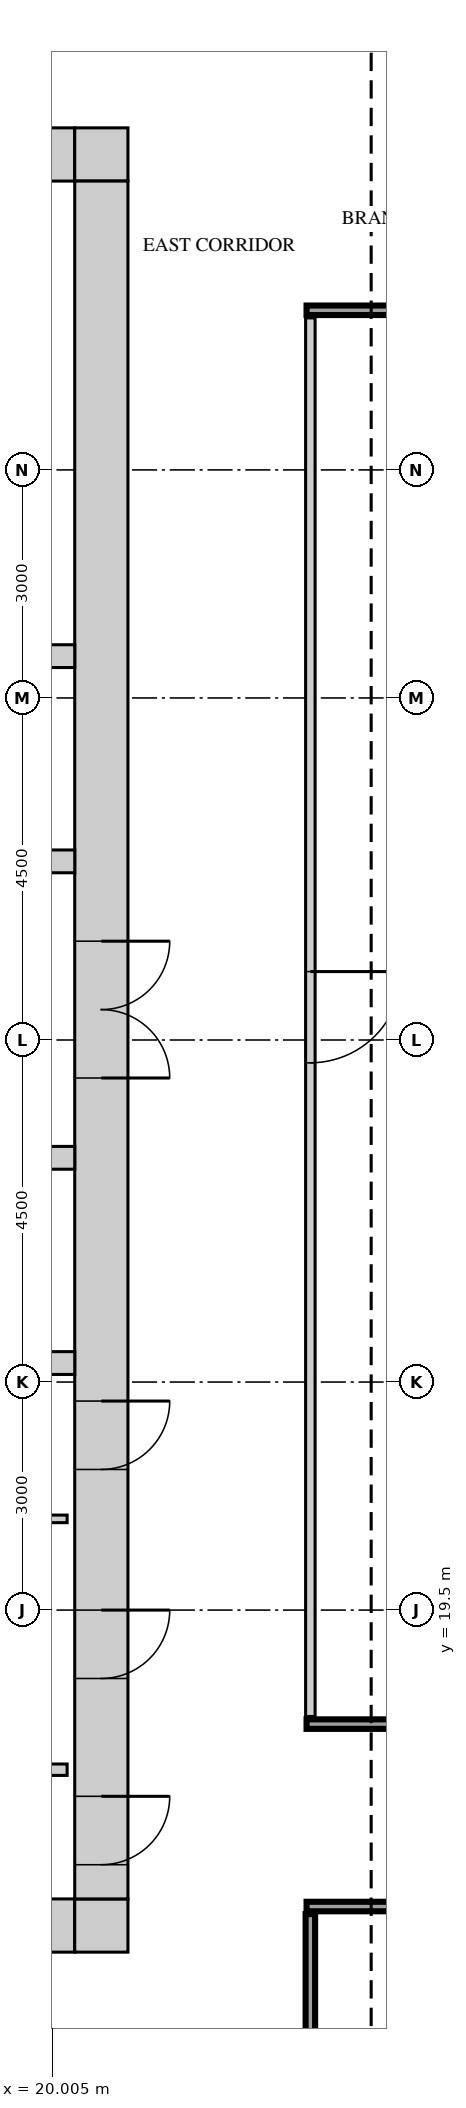
"""IFC4 building model, lengths in metres.
Left out: names, types, materials, properties, quantities, classifications, styles, units other than length and angle.
Written with IfcOpenShell. Run it as: python <this file> out.ifc"""

import sys

from ifc_helpers import new_model, si_unit, direction, frame, frame_2d, origin, place, context, subcontext, project, spatial, rectangle, extrude, source, transform, mapped, element, fill, save


model = new_model("IFC4")
c1 = context("Model", 3, precision=1e-05, world=origin(), true_north=direction((0.0, 1.0)))
c2 = subcontext(c1, "Body", "Model", "MODEL_VIEW")
j1 = project(units=[si_unit("LENGTHUNIT", "METRE"), si_unit("PLANEANGLEUNIT", "RADIAN")], contexts=[c1])
p1 = place(None, origin())
s1 = spatial("IfcSite", under=j1, at=p1, CompositionType="ELEMENT")
p2 = place(p1, origin())
s2 = spatial("IfcBuilding", under=s1, at=p2, CompositionType="ELEMENT")
p3 = place(p2, frame((0.0, 0.0, 222.2)))
s3 = spatial("IfcBuildingStorey", under=s2, at=p3, CompositionType="ELEMENT", Elevation=222.2)
m1 = source(origin(), c2, "Body", "SweptSolid", [
    extrude(rectangle(XDim=13.6, YDim=0.7, at=frame_2d((6.8, 0.0))), origin(), (0.0, 0.0, 1.0), 3.75),
])
p4 = place(p3, frame((6.7, 38.65, 0.0), z_axis=(0.0, 0.0, 1.0), x_axis=(1.0, 0.0, 0.0)))
e1 = element("IfcWall", 1, at=p4, inside=s3, PredefinedType="SHEAR", context=c2, shape_type="MappedRepresentation", body=[
    mapped(m1, transform((0.0, 0.0, 0.0))),
])
m2 = source(origin(), c2, "Body", "SweptSolid", [
    extrude(rectangle(XDim=0.9, YDim=2.1, at=frame_2d((0.45, 1.05))), frame((0.0, 0.36, 0.0), z_axis=(0.0, -1.0, 0.0), x_axis=(1.0, 0.0, 0.0)), (0.0, 0.0, 1.0), 0.72),
])
p5 = place(p4, frame((3.0, 0.0, 0.0)))
e2 = element("IfcOpeningElement", 2, at=p5, cuts=e1, PredefinedType="OPENING", context=c2, shape_type="MappedRepresentation", body=[
    mapped(m2, transform((0.0, 0.0, 0.0))),
])
p6 = place(p4, frame((9.7, 0.0, 0.0)))
e3 = element("IfcOpeningElement", 3, at=p6, cuts=e1, PredefinedType="OPENING", context=c2, shape_type="MappedRepresentation", body=[
    mapped(m2, transform((0.0, 0.0, 0.0))),
])
m3 = source(origin(), c2, "Body", "SweptSolid", [
    extrude(rectangle(XDim=0.7, YDim=0.7, at=frame_2d((0.35, 0.0))), origin(), (0.0, 0.0, 1.0), 3.75),
])
p7 = place(p3, frame((20.3, 38.65, 0.0), z_axis=(0.0, 0.0, 1.0), x_axis=(1.0, 0.0, 0.0)))
e4 = element("IfcWall", 4, at=p7, inside=s3, PredefinedType="SHEAR", context=c2, shape_type="MappedRepresentation", body=[
    mapped(m3, transform((0.0, 0.0, 0.0))),
])
p8 = place(p3, frame((6.7, 15.35, 0.0), z_axis=(0.0, 0.0, 1.0), x_axis=(1.0, 0.0, 0.0)))
e5 = element("IfcWall", 5, at=p8, inside=s3, PredefinedType="SHEAR", context=c2, shape_type="MappedRepresentation", body=[
    mapped(m1, transform((0.0, 0.0, 0.0))),
])
m4 = source(origin(), c2, "Body", "SweptSolid", [
    extrude(rectangle(XDim=1.2, YDim=2.1, at=frame_2d((0.6, 1.05))), frame((0.0, 0.36, 0.0), z_axis=(0.0, -1.0, 0.0), x_axis=(1.0, 0.0, 0.0)), (0.0, 0.0, 1.0), 0.72),
])
p9 = place(p8, frame((5.5, 0.0, 0.0)))
e6 = element("IfcOpeningElement", 6, at=p9, cuts=e5, PredefinedType="OPENING", context=c2, shape_type="MappedRepresentation", body=[
    mapped(m4, transform((0.0, 0.0, 0.0))),
])
p10 = place(p8, frame((2.15, 0.0, 0.0)))
e7 = element("IfcOpeningElement", 7, at=p10, cuts=e5, PredefinedType="OPENING", context=c2, shape_type="MappedRepresentation", body=[
    mapped(m4, transform((0.0, 0.0, 0.0))),
])
m5 = source(origin(), c2, "Body", "SweptSolid", [
    extrude(rectangle(XDim=1.0, YDim=2.1, at=frame_2d((0.5, 1.05))), frame((0.0, 0.36, 0.0), z_axis=(0.0, -1.0, 0.0), x_axis=(1.0, 0.0, 0.0)), (0.0, 0.0, 1.0), 0.72),
])
p11 = place(p8, frame((8.0, 0.0, 0.0)))
e8 = element("IfcOpeningElement", 8, at=p11, cuts=e5, PredefinedType="OPENING", context=c2, shape_type="MappedRepresentation", body=[
    mapped(m5, transform((0.0, 0.0, 0.0))),
])
p12 = place(p3, frame((20.3, 15.35, 0.0), z_axis=(0.0, 0.0, 1.0), x_axis=(1.0, 0.0, 0.0)))
e9 = element("IfcWall", 9, at=p12, inside=s3, PredefinedType="SHEAR", context=c2, shape_type="MappedRepresentation", body=[
    mapped(m3, transform((0.0, 0.0, 0.0))),
])
m6 = source(origin(), c2, "Body", "SweptSolid", [
    extrude(rectangle(XDim=22.6, YDim=0.7, at=frame_2d((11.3, 0.0))), origin(), (0.0, 0.0, 1.0), 3.75),
])
p13 = place(p3, frame((20.65, 15.7, 0.0), z_axis=(0.0, 0.0, 1.0), x_axis=(0.0, 1.0, 0.0)))
e10 = element("IfcWall", 10, at=p13, inside=s3, PredefinedType="SHEAR", context=c2, shape_type="MappedRepresentation", body=[
    mapped(m6, transform((0.0, 0.0, 0.0))),
])
m7 = source(origin(), c2, "Body", "SweptSolid", [
    extrude(rectangle(XDim=1.8, YDim=2.1, at=frame_2d((0.9, 1.05))), frame((0.0, 0.36, 0.0), z_axis=(0.0, -1.0, 0.0), x_axis=(1.0, 0.0, 0.0)), (0.0, 0.0, 1.0), 0.72),
])
p14 = place(p13, frame((10.8, 0.0, 0.0)))
e11 = element("IfcOpeningElement", 11, at=p14, cuts=e10, PredefinedType="OPENING", context=c2, shape_type="MappedRepresentation", body=[
    mapped(m7, transform((0.0, 0.0, 0.0))),
])
p15 = place(p13, frame((0.45, 0.0, 0.0)))
e12 = element("IfcOpeningElement", 12, at=p15, cuts=e10, PredefinedType="OPENING", context=c2, shape_type="MappedRepresentation", body=[
    mapped(m2, transform((0.0, 0.0, 0.0))),
])
p16 = place(p13, frame((2.9, 0.0, 0.0)))
e13 = element("IfcOpeningElement", 13, at=p16, cuts=e10, PredefinedType="OPENING", context=c2, shape_type="MappedRepresentation", body=[
    mapped(m2, transform((0.0, 0.0, 0.0))),
])
p17 = place(p13, frame((5.65, 0.0, 0.0)))
e14 = element("IfcOpeningElement", 14, at=p17, cuts=e10, PredefinedType="OPENING", context=c2, shape_type="MappedRepresentation", body=[
    mapped(m2, transform((0.0, 0.0, 0.0))),
])
m8 = source(origin(), c2, "Body", "SweptSolid", [
    extrude(rectangle(XDim=13.6, YDim=0.3, at=frame_2d((6.8, 0.0))), origin(), (0.0, 0.0, 1.0), 3.75),
])
for number, where, z_axis, x_axis in (
    (15, (6.7, 22.75, 0.0), (0.0, 0.0, 1.0), (1.0, 0.0, 0.0)),
    (16, (6.7, 32.05, 0.0), (0.0, 0.0, 1.0), (1.0, 0.0, 0.0)),
):
    element("IfcWall", number, at=place(p3, frame(where, z_axis=z_axis, x_axis=x_axis)), inside=s3, PredefinedType="STANDARD", context=c2, shape_type="MappedRepresentation", body=[
        mapped(m8, transform((0.0, 0.0, 0.0))),
    ])
p18 = place(p3, frame((6.7, 29.35, 0.0), z_axis=(0.0, 0.0, 1.0), x_axis=(1.0, 0.0, 0.0)))
e17 = element("IfcWall", 17, at=p18, inside=s3, PredefinedType="STANDARD", context=c2, shape_type="MappedRepresentation", body=[
    mapped(m8, transform((0.0, 0.0, 0.0))),
])
m9 = source(origin(), c2, "Body", "SweptSolid", [
    extrude(rectangle(XDim=1.2, YDim=2.1, at=frame_2d((0.6, 1.05))), frame((0.0, 0.16, 0.0), z_axis=(0.0, -1.0, 0.0), x_axis=(1.0, 0.0, 0.0)), (0.0, 0.0, 1.0), 0.32),
])
p19 = place(p18, frame((1.05, 0.0, 0.0)))
e18 = element("IfcOpeningElement", 18, at=p19, cuts=e17, PredefinedType="OPENING", context=c2, shape_type="MappedRepresentation", body=[
    mapped(m9, transform((0.0, 0.0, 0.0))),
])
p20 = place(p18, frame((3.6, 0.0, 0.0)))
e19 = element("IfcOpeningElement", 19, at=p20, cuts=e17, PredefinedType="OPENING", context=c2, shape_type="MappedRepresentation", body=[
    mapped(m9, transform((0.0, 0.0, 0.0))),
])
p21 = place(p18, frame((6.15, 0.0, 0.0)))
e20 = element("IfcOpeningElement", 20, at=p21, cuts=e17, PredefinedType="OPENING", context=c2, shape_type="MappedRepresentation", body=[
    mapped(m9, transform((0.0, 0.0, 0.0))),
])
p22 = place(p18, frame((8.7, 0.0, 0.0)))
e21 = element("IfcOpeningElement", 21, at=p22, cuts=e17, PredefinedType="OPENING", context=c2, shape_type="MappedRepresentation", body=[
    mapped(m9, transform((0.0, 0.0, 0.0))),
])
p23 = place(p18, frame((11.25, 0.0, 0.0)))
e22 = element("IfcOpeningElement", 22, at=p23, cuts=e17, PredefinedType="OPENING", context=c2, shape_type="MappedRepresentation", body=[
    mapped(m9, transform((0.0, 0.0, 0.0))),
])
p24 = place(p3, frame((6.7, 25.45, 0.0), z_axis=(0.0, 0.0, 1.0), x_axis=(1.0, 0.0, 0.0)))
e23 = element("IfcWall", 23, at=p24, inside=s3, PredefinedType="STANDARD", context=c2, shape_type="MappedRepresentation", body=[
    mapped(m8, transform((0.0, 0.0, 0.0))),
])
p25 = place(p24, frame((1.05, 0.0, 0.0)))
e24 = element("IfcOpeningElement", 24, at=p25, cuts=e23, PredefinedType="OPENING", context=c2, shape_type="MappedRepresentation", body=[
    mapped(m9, transform((0.0, 0.0, 0.0))),
])
p26 = place(p24, frame((3.6, 0.0, 0.0)))
e25 = element("IfcOpeningElement", 25, at=p26, cuts=e23, PredefinedType="OPENING", context=c2, shape_type="MappedRepresentation", body=[
    mapped(m9, transform((0.0, 0.0, 0.0))),
])
p27 = place(p24, frame((6.15, 0.0, 0.0)))
e26 = element("IfcOpeningElement", 26, at=p27, cuts=e23, PredefinedType="OPENING", context=c2, shape_type="MappedRepresentation", body=[
    mapped(m9, transform((0.0, 0.0, 0.0))),
])
p28 = place(p24, frame((8.7, 0.0, 0.0)))
e27 = element("IfcOpeningElement", 27, at=p28, cuts=e23, PredefinedType="OPENING", context=c2, shape_type="MappedRepresentation", body=[
    mapped(m9, transform((0.0, 0.0, 0.0))),
])
p29 = place(p24, frame((11.25, 0.0, 0.0)))
e28 = element("IfcOpeningElement", 28, at=p29, cuts=e23, PredefinedType="OPENING", context=c2, shape_type="MappedRepresentation", body=[
    mapped(m9, transform((0.0, 0.0, 0.0))),
])
m10 = source(origin(), c2, "Body", "SweptSolid", [
    extrude(rectangle(XDim=10.85, YDim=0.125, at=frame_2d((5.425, 0.0))), origin(), (0.0, 0.0, 1.0), 3.8),
])
p30 = place(p3, frame((23.4, 4.65, 0.0), z_axis=(0.0, 0.0, 1.0), x_axis=(0.0, 1.0, 0.0)))
e29 = element("IfcWall", 29, at=p30, inside=s3, PredefinedType="PARTITIONING", context=c2, shape_type="MappedRepresentation", body=[
    mapped(m10, transform((0.0, 0.0, 0.0))),
])
m11 = source(origin(), c2, "Body", "SweptSolid", [
    extrude(rectangle(XDim=0.9, YDim=2.1, at=frame_2d((0.45, 1.05))), frame((0.0, 0.073, 0.0), z_axis=(0.0, -1.0, 0.0), x_axis=(1.0, 0.0, 0.0)), (0.0, 0.0, 1.0), 0.145),
])
p31 = place(p30, frame((4.5, 0.0, 0.0)))
e30 = element("IfcOpeningElement", 30, at=p31, cuts=e29, PredefinedType="OPENING", context=c2, shape_type="MappedRepresentation", body=[
    mapped(m11, transform((0.0, 0.0, 0.0))),
])
m12 = source(origin(), c2, "Body", "SweptSolid", [
    extrude(rectangle(XDim=26.0, YDim=0.125, at=frame_2d((13.0, 0.0))), origin(), (0.0, 0.0, 1.0), 3.8),
])
p32 = place(p3, frame((23.35, 15.6, 0.0), z_axis=(0.0, 0.0, 1.0), x_axis=(1.0, 0.0, 0.0)))
e31 = element("IfcWall", 31, at=p32, inside=s3, PredefinedType="PARTITIONING", context=c2, shape_type="MappedRepresentation", body=[
    mapped(m12, transform((0.0, 0.0, 0.0))),
])
p33 = place(p32, frame((4.05, 0.0, 0.0)))
e32 = element("IfcOpeningElement", 32, at=p33, cuts=e31, PredefinedType="OPENING", context=c2, shape_type="MappedRepresentation", body=[
    mapped(m11, transform((0.0, 0.0, 0.0))),
])
m13 = source(origin(), c2, "Body", "SweptSolid", [
    extrude(rectangle(XDim=1.0, YDim=2.1, at=frame_2d((0.5, 1.05))), frame((0.0, 0.073, 0.0), z_axis=(0.0, -1.0, 0.0), x_axis=(1.0, 0.0, 0.0)), (0.0, 0.0, 1.0), 0.145),
])
p34 = place(p32, frame((6.85, 0.0, 0.0)))
e33 = element("IfcOpeningElement", 33, at=p34, cuts=e31, PredefinedType="OPENING", context=c2, shape_type="MappedRepresentation", body=[
    mapped(m13, transform((0.0, 0.0, 0.0))),
])
p35 = place(p32, frame((9.25, 0.0, 0.0)))
e34 = element("IfcOpeningElement", 34, at=p35, cuts=e31, PredefinedType="OPENING", context=c2, shape_type="MappedRepresentation", body=[
    mapped(m11, transform((0.0, 0.0, 0.0))),
])
p36 = place(p32, frame((15.1, 0.0, 0.0)))
e35 = element("IfcOpeningElement", 35, at=p36, cuts=e31, PredefinedType="OPENING", context=c2, shape_type="MappedRepresentation", body=[
    mapped(m11, transform((0.0, 0.0, 0.0))),
])
p37 = place(p32, frame((22.6, 0.0, 0.0)))
e36 = element("IfcOpeningElement", 36, at=p37, cuts=e31, PredefinedType="OPENING", context=c2, shape_type="MappedRepresentation", body=[
    mapped(m11, transform((0.0, 0.0, 0.0))),
])
m14 = source(origin(), c2, "Body", "SweptSolid", [
    extrude(rectangle(XDim=4.0, YDim=0.15, at=frame_2d((2.0, 0.0))), origin(), (0.0, 0.0, 1.0), 3.8),
])
p38 = place(p3, frame((16.2, 17.4, 0.0), z_axis=(0.0, 0.0, 1.0), x_axis=(1.0, 0.0, 0.0)))
e37 = element("IfcWall", 37, at=p38, inside=s3, PredefinedType="PARTITIONING", context=c2, shape_type="MappedRepresentation", body=[
    mapped(m14, transform((0.0, 0.0, 0.0))),
])
p39 = place(p3, frame((23.35, 18.0, 0.0), z_axis=(0.0, 0.0, 1.0), x_axis=(1.0, 0.0, 0.0)))
e38 = element("IfcWall", 38, at=p39, inside=s3, PredefinedType="PARTITIONING", context=c2, shape_type="MappedRepresentation", body=[
    mapped(m12, transform((0.0, 0.0, 0.0))),
])
m15 = source(origin(), c2, "Body", "SweptSolid", [
    extrude(rectangle(XDim=1.2, YDim=2.1, at=frame_2d((0.6, 1.05))), frame((0.0, 0.073, 0.0), z_axis=(0.0, -1.0, 0.0), x_axis=(1.0, 0.0, 0.0)), (0.0, 0.0, 1.0), 0.145),
])
p40 = place(p39, frame((11.55, 0.0, 0.0)))
e39 = element("IfcOpeningElement", 39, at=p40, cuts=e38, PredefinedType="OPENING", context=c2, shape_type="MappedRepresentation", body=[
    mapped(m15, transform((0.0, 0.0, 0.0))),
])
p41 = place(p39, frame((21.3, 0.0, 0.0)))
e40 = element("IfcOpeningElement", 40, at=p41, cuts=e38, PredefinedType="OPENING", context=c2, shape_type="MappedRepresentation", body=[
    mapped(m15, transform((0.0, 0.0, 0.0))),
])
m16 = source(origin(), c2, "Body", "SweptSolid", [
    extrude(rectangle(XDim=18.4, YDim=0.125, at=frame_2d((9.2, 0.0))), origin(), (0.0, 0.0, 1.0), 3.8),
])
p42 = place(p3, frame((23.4, 18.1, 0.0), z_axis=(0.0, 0.0, 1.0), x_axis=(0.0, 1.0, 0.0)))
e41 = element("IfcWall", 41, at=p42, inside=s3, PredefinedType="PARTITIONING", context=c2, shape_type="MappedRepresentation", body=[
    mapped(m16, transform((0.0, 0.0, 0.0))),
])
p43 = place(p42, frame((8.6, 0.0, 0.0)))
e42 = element("IfcOpeningElement", 42, at=p43, cuts=e41, PredefinedType="OPENING", context=c2, shape_type="MappedRepresentation", body=[
    mapped(m15, transform((0.0, 0.0, 0.0))),
])
m17 = source(origin(), c2, "Body", "SweptSolid", [
    extrude(rectangle(XDim=4.1, YDim=0.1, at=frame_2d((2.05, 0.0))), origin(), (0.0, 0.0, 1.0), 3.8),
])
p44 = place(p3, frame((16.1, 20.7, 0.0), z_axis=(0.0, 0.0, 1.0), x_axis=(1.0, 0.0, 0.0)))
e43 = element("IfcWall", 43, at=p44, inside=s3, PredefinedType="PARTITIONING", context=c2, shape_type="MappedRepresentation", body=[
    mapped(m17, transform((0.0, 0.0, 0.0))),
])
p45 = place(p3, frame((23.35, 36.6, 0.0), z_axis=(0.0, 0.0, 1.0), x_axis=(1.0, 0.0, 0.0)))
e44 = element("IfcWall", 44, at=p45, inside=s3, PredefinedType="PARTITIONING", context=c2, shape_type="MappedRepresentation", body=[
    mapped(m12, transform((0.0, 0.0, 0.0))),
])
m18 = source(origin(), c2, "Body", "SweptSolid", [
    extrude(rectangle(XDim=1.8, YDim=2.1, at=frame_2d((0.9, 1.05))), frame((0.0, 0.3, 0.0), z_axis=(0.0, -1.0, 0.0), x_axis=(1.0, 0.0, 0.0)), (0.0, 0.0, 1.0), 0.6),
])
p46 = place(p14, origin())
e45 = element("IfcDoor", 45, at=p46, inside=s3, OperationType="DOUBLE_DOOR_SINGLE_SWING", PredefinedType="DOOR", context=c2, shape_type="MappedRepresentation", body=[
    mapped(m18, transform((0.0, 0.0, 0.0))),
])
fill(e11, e45)
m19 = source(origin(), c2, "Body", "SweptSolid", [
    extrude(rectangle(XDim=0.9, YDim=2.1, at=frame_2d((0.45, 1.05))), frame((0.0, 0.3, 0.0), z_axis=(0.0, -1.0, 0.0), x_axis=(1.0, 0.0, 0.0)), (0.0, 0.0, 1.0), 0.6),
])
p47 = place(p15, origin())
e46 = element("IfcDoor", 46, at=p47, inside=s3, OperationType="SINGLE_SWING_RIGHT", PredefinedType="DOOR", context=c2, shape_type="MappedRepresentation", body=[
    mapped(m19, transform((0.0, 0.0, 0.0))),
])
fill(e12, e46)
p48 = place(p16, origin())
e47 = element("IfcDoor", 47, at=p48, inside=s3, OperationType="SINGLE_SWING_RIGHT", PredefinedType="DOOR", context=c2, shape_type="MappedRepresentation", body=[
    mapped(m19, transform((0.0, 0.0, 0.0))),
])
fill(e13, e47)
p49 = place(p17, origin())
e48 = element("IfcDoor", 48, at=p49, inside=s3, OperationType="SINGLE_SWING_RIGHT", PredefinedType="DOOR", context=c2, shape_type="MappedRepresentation", body=[
    mapped(m19, transform((0.0, 0.0, 0.0))),
])
fill(e14, e48)
m20 = source(origin(), c2, "Body", "SweptSolid", [
    extrude(rectangle(XDim=1.2, YDim=2.1, at=frame_2d((0.6, 1.05))), frame((0.0, 0.025, 0.0), z_axis=(0.0, -1.0, 0.0), x_axis=(1.0, 0.0, 0.0)), (0.0, 0.0, 1.0), 0.05),
])
p50 = place(p43, origin())
e49 = element("IfcDoor", 49, at=p50, inside=s3, OperationType="SINGLE_SWING_RIGHT", PredefinedType="DOOR", context=c2, shape_type="MappedRepresentation", body=[
    mapped(m20, transform((0.0, 0.0, 0.0))),
])
fill(e42, e49)
save(model, sys.argv[1])
